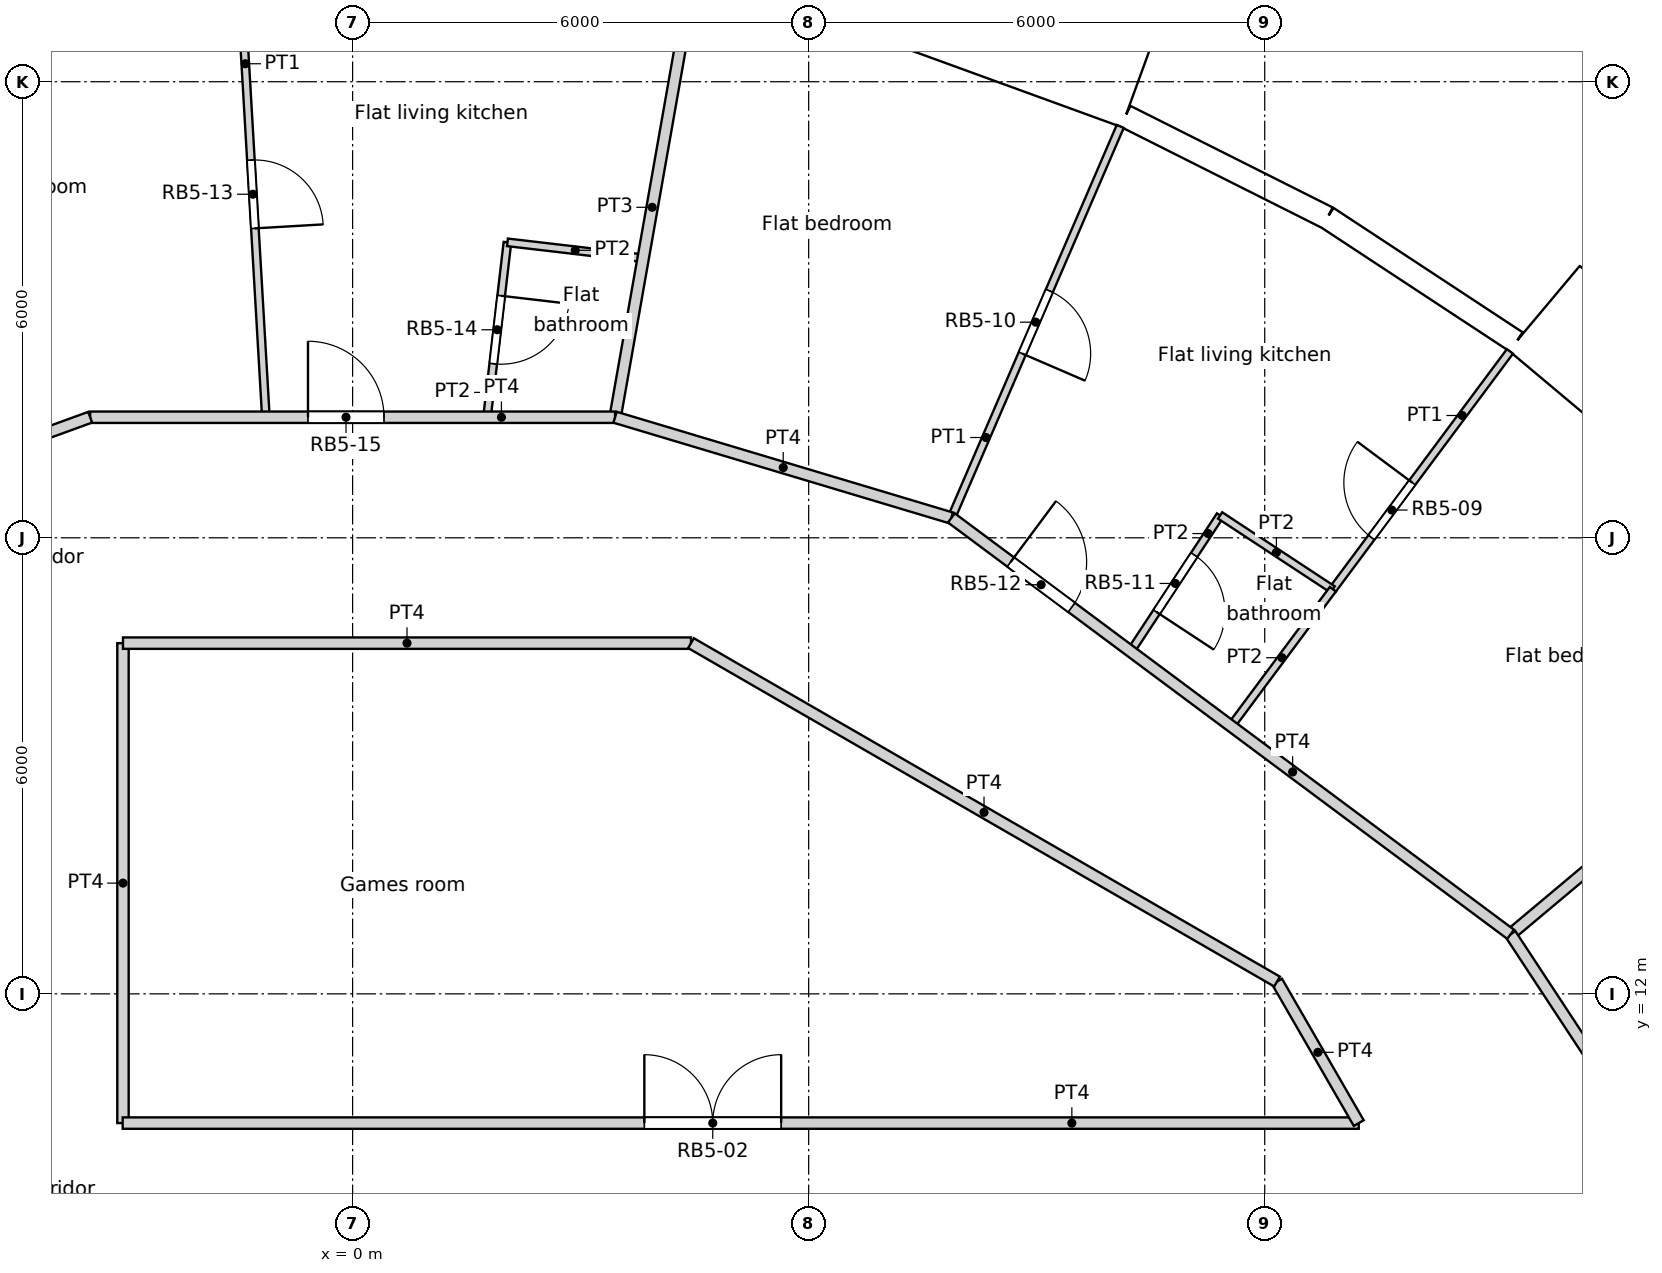
"""IFC4 building model, lengths in metres.
Left out: names, types, materials, properties, quantities, classifications, styles, units other than length and angle.
Written with IfcOpenShell. Run it as: python <this file> out.ifc"""

import sys

from ifc_helpers import new_model, si_unit, direction, frame, frame_2d, origin, origin_2d, place, context, subcontext, project, spatial, rectangle, circle, extrude, element, fill, save


model = new_model("IFC4")
c1 = context("Model", 3, precision=1e-05, world=origin(), true_north=direction((0.0, 1.0)))
c2 = subcontext(c1, "Body", "Model", "MODEL_VIEW")
j1 = project(units=[si_unit("LENGTHUNIT", "METRE"), si_unit("PLANEANGLEUNIT", "RADIAN")], contexts=[c1])
p1 = place(None, origin())
s1 = spatial("IfcSite", under=j1, at=p1, CompositionType="ELEMENT")
p2 = place(p1, origin())
s2 = spatial("IfcBuilding", under=s1, at=p2, CompositionType="ELEMENT")
p3 = place(p2, frame((0.0, 0.0, 169.2)))
s3 = spatial("IfcBuildingStorey", under=s2, at=p3, CompositionType="ELEMENT", Elevation=169.2)
for number, where, z_axis, x_axis in (
    (1, (14.659, 19.69, 0.0), (0.0, 0.0, 1.0), (1.0, 0.0, 0.0)),
    (2, (9.723, 22.54, 0.0), (0.0, 0.0, 1.0), (1.0, 0.0, 0.0)),
    (3, (4.263, 24.175, 0.0), (0.0, 0.0, 1.0), (1.0, 0.0, 0.0)),
    (4, (-1.427, 24.506, 0.0), (0.0, 0.0, 1.0), (1.0, 0.0, 0.0)),
):
    element("IfcColumn", number, at=place(p3, frame(where, z_axis=z_axis, x_axis=x_axis)), inside=s3, PredefinedType="COLUMN", context=c2, shape_type="SweptSolid", body=[
        extrude(circle(Radius=0.6, at=origin_2d()), origin(), (0.0, 0.0, 1.0), 3.6),
    ])
for number, where, z_axis, x_axis in (
    (5, (15.552, 10.603, 0.0), (0.0, 0.0, 1.0), (1.0, 0.0, 0.0)),
    (6, (11.735, 14.716, 0.0), (0.0, 0.0, 1.0), (1.0, 0.0, 0.0)),
    (7, (6.876, 17.521, 0.0), (0.0, 0.0, 1.0), (1.0, 0.0, 0.0)),
    (8, (1.406, 18.77, 0.0), (0.0, 0.0, 1.0), (1.0, 0.0, 0.0)),
    (9, (-4.188, 18.35, 0.0), (0.0, 0.0, 1.0), (1.0, 0.0, 0.0)),
):
    element("IfcColumn", number, at=place(p3, frame(where, z_axis=z_axis, x_axis=x_axis)), inside=s3, PredefinedType="COLUMN", context=c2, shape_type="SweptSolid", body=[
        extrude(circle(Radius=0.65, at=origin_2d()), origin(), (0.0, 0.0, 1.0), 3.6),
    ])
p4 = place(p3, frame((17.977, 19.09, -0.3), z_axis=(0.0, 0.0, 1.0), x_axis=(-0.766022196139, 0.642814121673, 0.0)))
e10 = element("IfcWall", 10, at=p4, inside=s3, PredefinedType="ELEMENTEDWALL", context=c2, shape_type="SweptSolid", body=[
    extrude(rectangle(XDim=3.0, YDim=1.45, at=frame_2d((1.5, 0.0))), origin(), (0.0, 0.0, 1.0), 3.6),
])
p5 = place(p4, frame((1.5, 0.0, 1.85)))
e11 = element("IfcOpeningElement", 11, at=p5, cuts=e10, PredefinedType="OPENING", context=c2, shape_type="SweptSolid", body=[
    extrude(circle(Radius=0.9, at=origin_2d()), frame((0.0, 0.735, 0.0), z_axis=(0.0, -1.0, 0.0), x_axis=(1.0, 0.0, 0.0)), (0.0, 0.0, 1.0), 1.47),
])
p6 = place(p3, frame((15.308, 20.578, 0.0), z_axis=(0.0, 0.0, 1.0), x_axis=(-0.835470659512, 0.549535055382, 0.0)))
e12 = element("IfcWall", 12, at=p6, inside=s3, PredefinedType="SOLIDWALL", context=c2, shape_type="SweptSolid", body=[
    extrude(rectangle(XDim=2.973, YDim=0.3, at=frame_2d((1.487, 0.0))), origin(), (0.0, 0.0, 1.0), 3.3),
])
p7 = place(p6, frame((1.486, 0.0, 1.55)))
e13 = element("IfcOpeningElement", 13, at=p7, cuts=e12, PredefinedType="OPENING", context=c2, shape_type="SweptSolid", body=[
    extrude(circle(Radius=0.9, at=origin_2d()), frame((0.0, 0.16, 0.0), z_axis=(0.0, -1.0, 0.0), x_axis=(1.0, 0.0, 0.0)), (0.0, 0.0, 1.0), 0.32),
])
p8 = place(p3, frame((12.824, 22.211, 0.0), z_axis=(0.0, 0.0, 1.0), x_axis=(-0.893637442555, 0.448789618045, 0.0)))
e14 = element("IfcWall", 14, at=p8, inside=s3, PredefinedType="SOLIDWALL", context=c2, shape_type="SweptSolid", body=[
    extrude(rectangle(XDim=2.973, YDim=0.3, at=frame_2d((1.486, 0.0))), origin(), (0.0, 0.0, 1.0), 3.3),
])
p9 = place(p8, frame((1.486, 0.0, 1.55)))
e15 = element("IfcOpeningElement", 15, at=p9, cuts=e14, PredefinedType="OPENING", context=c2, shape_type="SweptSolid", body=[
    extrude(circle(Radius=0.9, at=origin_2d()), frame((0.0, 0.16, 0.0), z_axis=(0.0, -1.0, 0.0), x_axis=(1.0, 0.0, 0.0)), (0.0, 0.0, 1.0), 0.32),
])
p10 = place(p3, frame((10.363, 24.087, -0.3), z_axis=(0.0, 0.0, 1.0), x_axis=(-0.939686455819, 0.342037080957, 0.0)))
e16 = element("IfcWall", 16, at=p10, inside=s3, PredefinedType="ELEMENTEDWALL", context=c2, shape_type="SweptSolid", body=[
    extrude(rectangle(XDim=3.0, YDim=1.45, at=frame_2d((1.5, 0.0))), origin(), (0.0, 0.0, 1.0), 3.6),
])
p11 = place(p10, frame((1.5, 0.0, 1.85)))
e17 = element("IfcOpeningElement", 17, at=p11, cuts=e16, PredefinedType="OPENING", context=c2, shape_type="SweptSolid", body=[
    extrude(circle(Radius=0.9, at=origin_2d()), frame((0.0, 0.735, 0.0), z_axis=(0.0, -1.0, 0.0), x_axis=(1.0, 0.0, 0.0)), (0.0, 0.0, 1.0), 1.47),
])
p12 = place(p3, frame((-3.025, 10.3, 0.0), z_axis=(0.0, 0.0, 1.0), x_axis=(1.0, 0.0, 0.0)))
e18 = element("IfcWall", 18, at=p12, inside=s3, PredefinedType="PARTITIONING", context=c2, shape_type="SweptSolid", body=[
    extrude(rectangle(XDim=16.262, YDim=0.15, at=frame_2d((8.131, 0.0))), origin(), (0.0, 0.0, 1.0), 3.3),
])
p13 = place(p12, frame((6.863, 0.0, 0.0)))
e19 = element("IfcOpeningElement", 19, at=p13, cuts=e18, PredefinedType="OPENING", context=c2, shape_type="SweptSolid", body=[
    extrude(rectangle(XDim=1.8, YDim=2.1, at=frame_2d((0.9, 1.05))), frame((0.0, 0.075, 0.0), z_axis=(0.0, -1.0, 0.0), x_axis=(1.0, 0.0, 0.0)), (0.0, 0.0, 1.0), 0.15),
])
p14 = place(p3, frame((12.162, 12.162, 0.0), z_axis=(0.0, 0.0, 1.0), x_axis=(0.499961633463, -0.866047553582, 0.0)))
e20 = element("IfcWall", 20, at=p14, inside=s3, PredefinedType="PARTITIONING", context=c2, shape_type="SweptSolid", body=[
    extrude(rectangle(XDim=2.15, YDim=0.15, at=frame_2d((1.075, 0.0))), origin(), (0.0, 0.0, 1.0), 3.3),
])
p15 = place(p3, frame((15.235, 12.784, 0.0), z_axis=(0.0, 0.0, 1.0), x_axis=(0.54943003049, -0.83553973071, 0.0)))
e21 = element("IfcWall", 21, at=p15, inside=s3, PredefinedType="PARTITIONING", context=c2, shape_type="SweptSolid", body=[
    extrude(rectangle(XDim=4.617, YDim=0.15, at=frame_2d((2.309, 0.0))), origin(), (0.0, 0.0, 1.0), 3.3),
])
p16 = place(p3, frame((7.877, 18.262, 0.0), z_axis=(0.0, 0.0, 1.0), x_axis=(0.802112550244, -0.597172886811, 0.0)))
e22 = element("IfcWall", 22, at=p16, inside=s3, PredefinedType="PARTITIONING", context=c2, shape_type="SweptSolid", body=[
    extrude(rectangle(XDim=9.173, YDim=0.15, at=frame_2d((4.586, 0.0))), origin(), (0.0, 0.0, 1.0), 3.3),
])
p17 = place(p16, frame((0.972, 0.0, 0.0)))
e23 = element("IfcOpeningElement", 23, at=p17, cuts=e22, PredefinedType="OPENING", context=c2, shape_type="SweptSolid", body=[
    extrude(rectangle(XDim=1.0, YDim=2.1, at=frame_2d((0.5, 1.05))), frame((0.0, 0.075, 0.0), z_axis=(0.0, -1.0, 0.0), x_axis=(1.0, 0.0, 0.0)), (0.0, 0.0, 1.0), 0.15),
])
p18 = place(p3, frame((4.452, 16.614, 0.0), z_axis=(0.0, 0.0, 1.0), x_axis=(0.866005203721, -0.500034985904, 0.0)))
e24 = element("IfcWall", 24, at=p18, inside=s3, PredefinedType="PARTITIONING", context=c2, shape_type="SweptSolid", body=[
    extrude(rectangle(XDim=8.903, YDim=0.15, at=frame_2d((4.452, 0.0))), origin(), (0.0, 0.0, 1.0), 3.3),
])
p19 = place(p3, frame((-3.021, 16.614, 0.0), z_axis=(0.0, 0.0, 1.0), x_axis=(1.0, 0.0, 0.0)))
e25 = element("IfcWall", 25, at=p19, inside=s3, PredefinedType="PARTITIONING", context=c2, shape_type="SweptSolid", body=[
    extrude(rectangle(XDim=7.473, YDim=0.15, at=frame_2d((3.736, 0.0))), origin(), (0.0, 0.0, 1.0), 3.3),
])
p20 = place(p3, frame((-3.021, 10.3, 0.0), z_axis=(0.0, 0.0, 1.0), x_axis=(0.0, 1.0, 0.0)))
e26 = element("IfcWall", 26, at=p20, inside=s3, PredefinedType="PARTITIONING", context=c2, shape_type="SweptSolid", body=[
    extrude(rectangle(XDim=6.314, YDim=0.15, at=frame_2d((3.157, 0.0))), origin(), (0.0, 0.0, 1.0), 3.3),
])
p21 = place(p3, frame((3.453, 19.586, 0.0), z_axis=(0.0, 0.0, 1.0), x_axis=(0.95796149329, -0.286896806141, 0.0)))
e27 = element("IfcWall", 27, at=p21, inside=s3, PredefinedType="PARTITIONING", context=c2, shape_type="SweptSolid", body=[
    extrude(rectangle(XDim=4.618, YDim=0.15, at=frame_2d((2.309, 0.0))), origin(), (0.0, 0.0, 1.0), 3.3),
])
p22 = place(p3, frame((-3.453, 19.586, 0.0), z_axis=(0.0, 0.0, 1.0), x_axis=(1.0, 0.0, 0.0)))
e28 = element("IfcWall", 28, at=p22, inside=s3, PredefinedType="PARTITIONING", context=c2, shape_type="SweptSolid", body=[
    extrude(rectangle(XDim=6.906, YDim=0.15, at=frame_2d((3.453, 0.0))), origin(), (0.0, 0.0, 1.0), 3.3),
])
p23 = place(p22, frame((2.866, 0.0, 0.0)))
e29 = element("IfcOpeningElement", 29, at=p23, cuts=e28, PredefinedType="OPENING", context=c2, shape_type="SweptSolid", body=[
    extrude(rectangle(XDim=1.0, YDim=2.1, at=frame_2d((0.5, 1.05))), frame((0.0, 0.075, 0.0), z_axis=(0.0, -1.0, 0.0), x_axis=(1.0, 0.0, 0.0)), (0.0, 0.0, 1.0), 0.15),
])
p24 = place(p3, frame((-9.944, 17.222, 0.0), z_axis=(0.0, 0.0, 1.0), x_axis=(0.939607544688, 0.342253797591, 0.0)))
e30 = element("IfcWall", 30, at=p24, inside=s3, PredefinedType="PARTITIONING", context=c2, shape_type="SweptSolid", body=[
    extrude(rectangle(XDim=6.908, YDim=0.15, at=frame_2d((3.454, 0.0))), origin(), (0.0, 0.0, 1.0), 3.3),
])
p25 = place(p24, frame((2.74, 0.0, 0.0)))
e31 = element("IfcOpeningElement", 31, at=p25, cuts=e30, PredefinedType="OPENING", context=c2, shape_type="SweptSolid", body=[
    extrude(rectangle(XDim=1.0, YDim=2.1, at=frame_2d((0.5, 1.05))), frame((0.0, 0.075, 0.0), z_axis=(0.0, -1.0, 0.0), x_axis=(1.0, 0.0, 0.0)), (0.0, 0.0, 1.0), 0.15),
])
p26 = place(p3, frame((15.235, 12.784, 0.0), z_axis=(0.0, 0.0, 1.0), x_axis=(0.76609059793, 0.642732600514, 0.0)))
e32 = element("IfcWall", 32, at=p26, inside=s3, PredefinedType="PARTITIONING", context=c2, shape_type="SweptSolid", body=[
    extrude(rectangle(XDim=5.609, YDim=0.15, at=frame_2d((2.804, 0.0))), origin(), (0.0, 0.0, 1.0), 3.3),
])
p27 = place(p3, frame((12.894, 17.32, 0.0), z_axis=(0.0, 0.0, 1.0), x_axis=(0.597235338427, 0.802066051229, 0.0)))
e33 = element("IfcWall", 33, at=p27, inside=s3, PredefinedType="PARTITIONING", context=c2, shape_type="SweptSolid", body=[
    extrude(rectangle(XDim=3.905, YDim=0.1, at=frame_2d((1.952, 0.0))), origin(), (0.0, 0.0, 1.0), 3.3),
])
p28 = place(p27, frame((0.853, 0.0, 0.0)))
e34 = element("IfcOpeningElement", 34, at=p28, cuts=e33, PredefinedType="OPENING", context=c2, shape_type="SweptSolid", body=[
    extrude(rectangle(XDim=0.9, YDim=2.1, at=frame_2d((0.45, 1.05))), frame((0.0, 0.05, 0.0), z_axis=(0.0, -1.0, 0.0), x_axis=(1.0, 0.0, 0.0)), (0.0, 0.0, 1.0), 0.1),
])
p29 = place(p3, frame((7.877, 18.261, 0.0), z_axis=(0.0, 0.0, 1.0), x_axis=(0.39610837783, 0.91820376443, 0.0)))
e35 = element("IfcWall", 35, at=p29, inside=s3, PredefinedType="PARTITIONING", context=c2, shape_type="SweptSolid", body=[
    extrude(rectangle(XDim=5.61, YDim=0.1, at=frame_2d((2.805, 0.0))), origin(), (0.0, 0.0, 1.0), 3.3),
])
p30 = place(p29, frame((2.355, 0.0, 0.0)))
e36 = element("IfcOpeningElement", 36, at=p30, cuts=e35, PredefinedType="OPENING", context=c2, shape_type="SweptSolid", body=[
    extrude(rectangle(XDim=0.9, YDim=2.1, at=frame_2d((0.45, 1.05))), frame((0.0, 0.05, 0.0), z_axis=(0.0, -1.0, 0.0), x_axis=(1.0, 0.0, 0.0)), (0.0, 0.0, 1.0), 0.1),
])
p31 = place(p3, frame((11.413, 18.294, 0.0), z_axis=(0.0, 0.0, 1.0), x_axis=(0.835530238932, -0.549444464738, 0.0)))
e37 = element("IfcWall", 37, at=p31, inside=s3, PredefinedType="PARTITIONING", context=c2, shape_type="SweptSolid", body=[
    extrude(rectangle(XDim=1.772, YDim=0.1, at=frame_2d((0.886, 0.0))), origin(), (0.0, 0.0, 1.0), 3.3),
])
p32 = place(p3, frame((10.236, 16.505, 0.0), z_axis=(0.0, 0.0, 1.0), x_axis=(0.5496123138, 0.835419837279, 0.0)))
e38 = element("IfcWall", 38, at=p32, inside=s3, PredefinedType="PARTITIONING", context=c2, shape_type="SweptSolid", body=[
    extrude(rectangle(XDim=2.142, YDim=0.1, at=frame_2d((1.071, 0.0))), origin(), (0.0, 0.0, 1.0), 3.3),
])
p33 = place(p32, frame((0.621, 0.0, 0.0)))
e39 = element("IfcOpeningElement", 39, at=p33, cuts=e38, PredefinedType="OPENING", context=c2, shape_type="SweptSolid", body=[
    extrude(rectangle(XDim=0.9, YDim=2.0, at=frame_2d((0.45, 1.0))), frame((0.0, 0.05, 0.0), z_axis=(0.0, -1.0, 0.0), x_axis=(1.0, 0.0, 0.0)), (0.0, 0.0, 1.0), 0.1),
])
p34 = place(p3, frame((11.556, 15.522, 0.0), z_axis=(0.0, 0.0, 1.0), x_axis=(0.596950542241, 0.802278037914, 0.0)))
e40 = element("IfcWall", 40, at=p34, inside=s3, PredefinedType="PARTITIONING", context=c2, shape_type="SweptSolid", body=[
    extrude(rectangle(XDim=2.245, YDim=0.1, at=frame_2d((1.123, 0.0))), origin(), (0.0, 0.0, 1.0), 3.3),
])
p35 = place(p3, frame((3.454, 19.586, 0.0), z_axis=(0.0, 0.0, 1.0), x_axis=(0.173700915874, 0.984798452387, 0.0)))
e41 = element("IfcWall", 41, at=p35, inside=s3, PredefinedType="PARTITIONING", context=c2, shape_type="SweptSolid", body=[
    extrude(rectangle(XDim=5.609, YDim=0.15, at=frame_2d((2.805, 0.0))), origin(), (0.0, 0.0, 1.0), 3.3),
])
p36 = place(p3, frame((-1.483, 25.454, 0.0), z_axis=(0.0, 0.0, 1.0), x_axis=(0.058147412668, -0.998308007781, 0.0)))
e42 = element("IfcWall", 42, at=p36, inside=s3, PredefinedType="PARTITIONING", context=c2, shape_type="SweptSolid", body=[
    extrude(rectangle(XDim=5.878, YDim=0.1, at=frame_2d((2.939, 0.0))), origin(), (0.0, 0.0, 1.0), 3.3),
])
p37 = place(p36, frame((2.489, 0.0, 0.0)))
e43 = element("IfcOpeningElement", 43, at=p37, cuts=e42, PredefinedType="OPENING", context=c2, shape_type="SweptSolid", body=[
    extrude(rectangle(XDim=0.9, YDim=2.1, at=frame_2d((0.45, 1.05))), frame((0.0, 0.05, 0.0), z_axis=(0.0, -1.0, 0.0), x_axis=(1.0, 0.0, 0.0)), (0.0, 0.0, 1.0), 0.1),
])
p38 = place(p3, frame((2.037, 21.887, 0.0), z_axis=(0.0, 0.0, 1.0), x_axis=(0.993215363366, -0.116289474906, 0.0)))
e44 = element("IfcWall", 44, at=p38, inside=s3, PredefinedType="PARTITIONING", context=c2, shape_type="SweptSolid", body=[
    extrude(rectangle(XDim=1.797, YDim=0.1, at=frame_2d((0.898, 0.0))), origin(), (0.0, 0.0, 1.0), 3.3),
])
p39 = place(p3, frame((1.768, 19.586, 0.0), z_axis=(0.0, 0.0, 1.0), x_axis=(0.116131951318, 0.993233794171, 0.0)))
e45 = element("IfcWall", 45, at=p39, inside=s3, PredefinedType="PARTITIONING", context=c2, shape_type="SweptSolid", body=[
    extrude(rectangle(XDim=2.317, YDim=0.1, at=frame_2d((1.158, 0.0))), origin(), (0.0, 0.0, 1.0), 3.3),
])
p40 = place(p39, frame((0.709, 0.0, 0.0)))
e46 = element("IfcOpeningElement", 46, at=p40, cuts=e45, PredefinedType="OPENING", context=c2, shape_type="SweptSolid", body=[
    extrude(rectangle(XDim=0.9, YDim=2.0, at=frame_2d((0.45, 1.0))), frame((0.0, 0.05, 0.0), z_axis=(0.0, -1.0, 0.0), x_axis=(1.0, 0.0, 0.0)), (0.0, 0.0, 1.0), 0.1),
])
p41 = place(p5, origin())
e47 = element("IfcWindow", 47, at=p41, inside=s3, PartitioningType="SINGLE_PANEL", PredefinedType="WINDOW", context=c2, shape_type="SweptSolid", body=[
    extrude(circle(Radius=0.9, at=origin_2d()), frame((0.0, 0.695, 0.0), z_axis=(0.0, -1.0, 0.0), x_axis=(1.0, 0.0, 0.0)), (0.0, 0.0, 1.0), 0.1),
])
fill(e11, e47)
p42 = place(p7, origin())
e48 = element("IfcWindow", 48, at=p42, inside=s3, PartitioningType="SINGLE_PANEL", PredefinedType="WINDOW", context=c2, shape_type="SweptSolid", body=[
    extrude(circle(Radius=0.9, at=origin_2d()), frame((0.0, 0.12, 0.0), z_axis=(0.0, -1.0, 0.0), x_axis=(1.0, 0.0, 0.0)), (0.0, 0.0, 1.0), 0.1),
])
fill(e13, e48)
p43 = place(p9, origin())
e49 = element("IfcWindow", 49, at=p43, inside=s3, PartitioningType="SINGLE_PANEL", PredefinedType="WINDOW", context=c2, shape_type="SweptSolid", body=[
    extrude(circle(Radius=0.9, at=origin_2d()), frame((0.0, 0.12, 0.0), z_axis=(0.0, -1.0, 0.0), x_axis=(1.0, 0.0, 0.0)), (0.0, 0.0, 1.0), 0.1),
])
fill(e15, e49)
p44 = place(p11, origin())
e50 = element("IfcWindow", 50, at=p44, inside=s3, PartitioningType="SINGLE_PANEL", PredefinedType="WINDOW", context=c2, shape_type="SweptSolid", body=[
    extrude(circle(Radius=0.9, at=origin_2d()), frame((0.0, 0.695, 0.0), z_axis=(0.0, -1.0, 0.0), x_axis=(1.0, 0.0, 0.0)), (0.0, 0.0, 1.0), 0.1),
])
fill(e17, e50)
p45 = place(p13, origin())
e51 = element("IfcDoor", 51, at=p45, inside=s3, OperationType="DOUBLE_DOOR_SINGLE_SWING", PredefinedType="DOOR", context=c2, shape_type="SweptSolid", body=[
    extrude(rectangle(XDim=1.8, YDim=2.1, at=frame_2d((0.9, 1.05))), frame((0.0, 0.025, 0.0), z_axis=(0.0, -1.0, 0.0), x_axis=(1.0, 0.0, 0.0)), (0.0, 0.0, 1.0), 0.05),
])
fill(e19, e51)
p46 = place(p28, origin())
e52 = element("IfcDoor", 52, at=p46, inside=s3, OperationType="SINGLE_SWING_RIGHT", PredefinedType="DOOR", context=c2, shape_type="SweptSolid", body=[
    extrude(rectangle(XDim=0.9, YDim=2.1, at=frame_2d((0.45, 1.05))), frame((0.0, 0.025, 0.0), z_axis=(0.0, -1.0, 0.0), x_axis=(1.0, 0.0, 0.0)), (0.0, 0.0, 1.0), 0.05),
])
fill(e34, e52)
p47 = place(p30, origin())
e53 = element("IfcDoor", 53, at=p47, inside=s3, OperationType="SINGLE_SWING_RIGHT", PredefinedType="DOOR", context=c2, shape_type="SweptSolid", body=[
    extrude(rectangle(XDim=0.9, YDim=2.1, at=frame_2d((0.45, 1.05))), frame((0.0, 0.025, 0.0), z_axis=(0.0, -1.0, 0.0), x_axis=(1.0, 0.0, 0.0)), (0.0, 0.0, 1.0), 0.05),
])
fill(e36, e53)
p48 = place(p33, origin())
e54 = element("IfcDoor", 54, at=p48, inside=s3, OperationType="SINGLE_SWING_RIGHT", PredefinedType="DOOR", context=c2, shape_type="SweptSolid", body=[
    extrude(rectangle(XDim=0.9, YDim=2.0, at=frame_2d((0.45, 1.0))), frame((0.0, 0.025, 0.0), z_axis=(0.0, -1.0, 0.0), x_axis=(1.0, 0.0, 0.0)), (0.0, 0.0, 1.0), 0.05),
])
fill(e39, e54)
p49 = place(p17, origin())
e55 = element("IfcDoor", 55, at=p49, inside=s3, OperationType="SINGLE_SWING_LEFT", PredefinedType="DOOR", context=c2, shape_type="SweptSolid", body=[
    extrude(rectangle(XDim=1.0, YDim=2.1, at=frame_2d((0.5, 1.05))), frame((0.0, 0.025, 0.0), z_axis=(0.0, -1.0, 0.0), x_axis=(1.0, 0.0, 0.0)), (0.0, 0.0, 1.0), 0.05),
])
fill(e23, e55)
p50 = place(p37, origin())
e56 = element("IfcDoor", 56, at=p50, inside=s3, OperationType="SINGLE_SWING_RIGHT", PredefinedType="DOOR", context=c2, shape_type="SweptSolid", body=[
    extrude(rectangle(XDim=0.9, YDim=2.1, at=frame_2d((0.45, 1.05))), frame((0.0, 0.025, 0.0), z_axis=(0.0, -1.0, 0.0), x_axis=(1.0, 0.0, 0.0)), (0.0, 0.0, 1.0), 0.05),
])
fill(e43, e56)
p51 = place(p40, origin())
e57 = element("IfcDoor", 57, at=p51, inside=s3, OperationType="SINGLE_SWING_LEFT", PredefinedType="DOOR", context=c2, shape_type="SweptSolid", body=[
    extrude(rectangle(XDim=0.9, YDim=2.0, at=frame_2d((0.45, 1.0))), frame((0.0, 0.025, 0.0), z_axis=(0.0, -1.0, 0.0), x_axis=(1.0, 0.0, 0.0)), (0.0, 0.0, 1.0), 0.05),
])
fill(e46, e57)
p52 = place(p23, origin())
e58 = element("IfcDoor", 58, at=p52, inside=s3, OperationType="SINGLE_SWING_LEFT", PredefinedType="DOOR", context=c2, shape_type="SweptSolid", body=[
    extrude(rectangle(XDim=1.0, YDim=2.1, at=frame_2d((0.5, 1.05))), frame((0.0, 0.025, 0.0), z_axis=(0.0, -1.0, 0.0), x_axis=(1.0, 0.0, 0.0)), (0.0, 0.0, 1.0), 0.05),
])
fill(e29, e58)
save(model, sys.argv[1])
